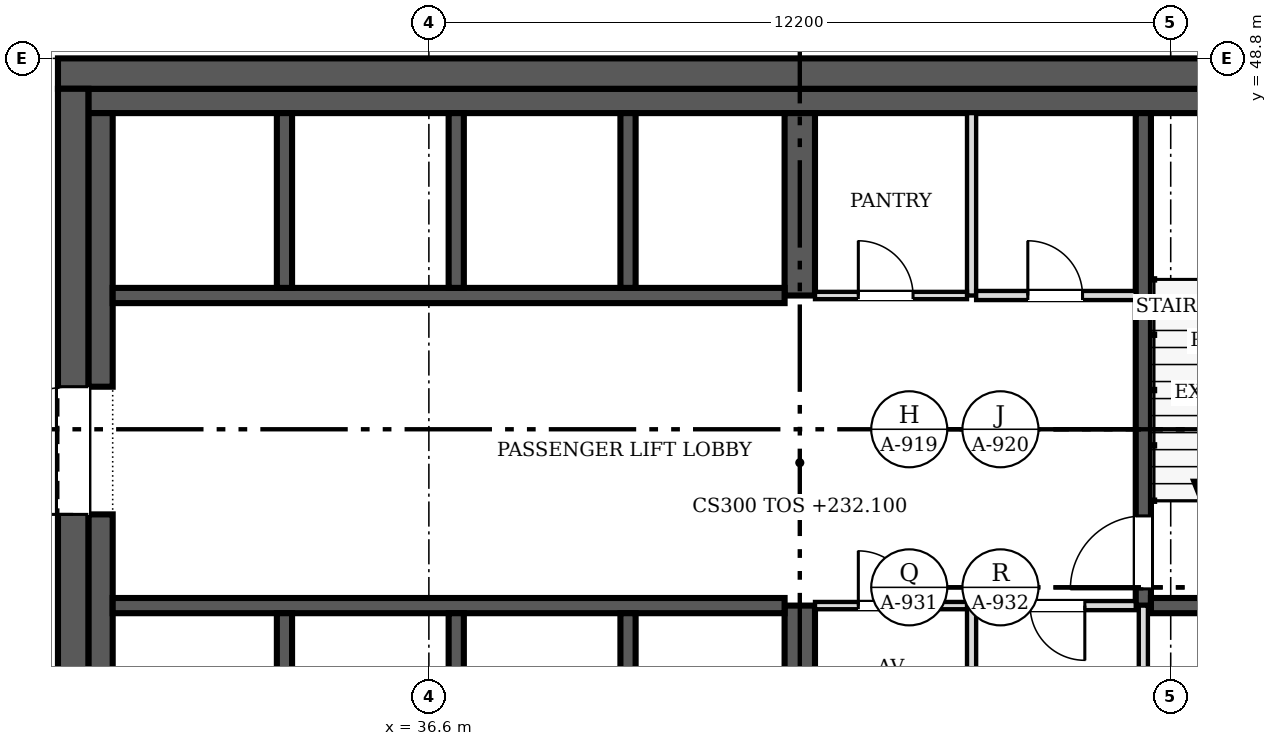
"""IFC4 building model, lengths in metres.
Left out: names, types, materials, properties, quantities, classifications, styles, units other than length and angle.
Written with IfcOpenShell. Run it as: python <this file> out.ifc"""

import sys

from ifc_helpers import new_model, si_unit, direction, frame, frame_2d, origin, place, context, subcontext, project, spatial, rectangle, extrude, source, transform, mapped, element, fill, save


model = new_model("IFC4")
c1 = context("Model", 3, precision=1e-05, world=origin(), true_north=direction((0.0, 1.0)))
c2 = subcontext(c1, "Body", "Model", "MODEL_VIEW")
j1 = project(units=[si_unit("LENGTHUNIT", "METRE"), si_unit("PLANEANGLEUNIT", "RADIAN")], contexts=[c1])
p1 = place(None, origin())
s1 = spatial("IfcSite", under=j1, at=p1, CompositionType="ELEMENT")
p2 = place(p1, origin())
s2 = spatial("IfcBuilding", under=s1, at=p2, CompositionType="ELEMENT")
p3 = place(p2, frame((0.0, 0.0, 232.1)))
s3 = spatial("IfcBuildingStorey", under=s2, at=p3, CompositionType="ELEMENT", Elevation=232.1)
p4 = place(p3, frame((30.75, 24.9, 0.0), z_axis=(0.0, 0.0, 1.0), x_axis=(0.0, 1.0, 0.0)))
e1 = element("IfcWall", 1, at=p4, inside=s3, PredefinedType="SHEAR", context=c2, shape_type="SweptSolid", body=[
    extrude(rectangle(XDim=23.4, YDim=0.5, at=frame_2d((11.7, 0.0))), origin(), (0.0, 0.0, 1.0), 4.8),
])
m1 = source(origin(), c2, "Body", "SweptSolid", [
    extrude(rectangle(XDim=2.1, YDim=2.4, at=frame_2d((1.05, 1.2))), frame((0.0, 0.26, 0.0), z_axis=(0.0, -1.0, 0.0), x_axis=(1.0, 0.0, 0.0)), (0.0, 0.0, 1.0), 0.52),
])
p5 = place(p4, frame((4.9, 0.0, 0.0)))
e2 = element("IfcOpeningElement", 2, at=p5, cuts=e1, PredefinedType="OPENING", context=c2, shape_type="MappedRepresentation", body=[
    mapped(m1, transform((0.0, 0.0, 0.0), scale=1.0)),
])
p6 = place(p4, frame((16.4, 0.0, 0.0)))
e3 = element("IfcOpeningElement", 3, at=p6, cuts=e1, PredefinedType="OPENING", context=c2, shape_type="MappedRepresentation", body=[
    mapped(m1, transform((0.0, 0.0, 0.0), scale=1.0)),
])
p7 = place(p3, frame((30.5, 48.55, 0.0), z_axis=(0.0, 0.0, 1.0), x_axis=(1.0, 0.0, 0.0)))
e4 = element("IfcWall", 4, at=p7, inside=s3, PredefinedType="SHEAR", context=c2, shape_type="SweptSolid", body=[
    extrude(rectangle(XDim=24.4, YDim=0.5, at=frame_2d((12.2, 0.0))), origin(), (0.0, 0.0, 1.0), 4.8),
])
p8 = place(p3, frame((31.0, 48.1, 0.0), z_axis=(0.0, 0.0, 1.0), x_axis=(1.0, 0.0, 0.0)))
e5 = element("IfcWall", 5, at=p8, inside=s3, PredefinedType="SOLIDWALL", context=c2, shape_type="SweptSolid", body=[
    extrude(rectangle(XDim=23.4, YDim=0.4, at=frame_2d((11.7, 0.0))), origin(), (0.0, 0.0, 1.0), 4.8),
])
p9 = place(p3, frame((31.2, 31.9, 0.0), z_axis=(0.0, 0.0, 1.0), x_axis=(0.0, 1.0, 0.0)))
e6 = element("IfcWall", 6, at=p9, inside=s3, PredefinedType="SOLIDWALL", context=c2, shape_type="SweptSolid", body=[
    extrude(rectangle(XDim=9.4, YDim=0.4, at=frame_2d((4.7, 0.0))), origin(), (0.0, 0.0, 1.0), 4.8),
])
p10 = place(p3, frame((31.2, 43.4, 0.0), z_axis=(0.0, 0.0, 1.0), x_axis=(0.0, 1.0, 0.0)))
e7 = element("IfcWall", 7, at=p10, inside=s3, PredefinedType="SOLIDWALL", context=c2, shape_type="SweptSolid", body=[
    extrude(rectangle(XDim=4.5, YDim=0.4, at=frame_2d((2.25, 0.0))), origin(), (0.0, 0.0, 1.0), 4.8),
])
p11 = place(p3, frame((42.7, 36.85, 0.0), z_axis=(0.0, 0.0, 1.0), x_axis=(0.0, 1.0, 0.0)))
e8 = element("IfcWall", 8, at=p11, inside=s3, PredefinedType="SHEAR", context=c2, shape_type="SweptSolid", body=[
    extrude(rectangle(XDim=2.95, YDim=0.5, at=frame_2d((1.475, 0.0))), origin(), (0.0, 0.0, 1.0), 4.8),
])
p12 = place(p3, frame((42.7, 44.9, 0.0), z_axis=(0.0, 0.0, 1.0), x_axis=(0.0, 1.0, 0.0)))
e9 = element("IfcWall", 9, at=p12, inside=s3, PredefinedType="SHEAR", context=c2, shape_type="SweptSolid", body=[
    extrude(rectangle(XDim=3.0, YDim=0.5, at=frame_2d((1.5, 0.0))), origin(), (0.0, 0.0, 1.0), 4.8),
])
for number, where, z_axis, x_axis in (
    (10, (31.4, 39.8, 0.0), (0.0, 0.0, 1.0), (1.0, 0.0, 0.0)),
    (11, (31.4, 44.9, 0.0), (0.0, 0.0, 1.0), (1.0, 0.0, 0.0)),
):
    element("IfcWall", number, at=place(p3, frame(where, z_axis=z_axis, x_axis=x_axis)), inside=s3, PredefinedType="SOLIDWALL", context=c2, shape_type="SweptSolid", body=[
        extrude(rectangle(XDim=11.05, YDim=0.25, at=frame_2d((5.525, 0.0))), origin(), (0.0, 0.0, 1.0), 4.8),
    ])
p13 = place(p3, frame((48.35, 47.9, 0.0), z_axis=(0.0, 0.0, 1.0), x_axis=(0.0, -1.0, 0.0)))
e12 = element("IfcWall", 12, at=p13, inside=s3, PredefinedType="SOLIDWALL", context=c2, shape_type="SweptSolid", body=[
    extrude(rectangle(XDim=8.1, YDim=0.25, at=frame_2d((4.05, 0.0))), origin(), (0.0, 0.0, 1.0), 4.8),
])
m2 = source(origin(), c2, "Body", "SweptSolid", [
    extrude(rectangle(XDim=1.2, YDim=2.1, at=frame_2d((0.6, 1.05))), frame((0.0, 0.135, 0.0), z_axis=(0.0, -1.0, 0.0), x_axis=(1.0, 0.0, 0.0)), (0.0, 0.0, 1.0), 0.27),
])
p14 = place(p13, frame((6.625, 0.0, 0.0)))
e13 = element("IfcOpeningElement", 13, at=p14, cuts=e12, PredefinedType="OPENING", context=c2, shape_type="MappedRepresentation", body=[
    mapped(m2, transform((0.0, 0.0, 0.0), scale=1.0)),
])
p15 = place(p3, frame((48.475, 39.8, 0.0), z_axis=(0.0, 0.0, 1.0), x_axis=(1.0, 0.0, 0.0)))
e14 = element("IfcWall", 14, at=p15, inside=s3, PredefinedType="SOLIDWALL", context=c2, shape_type="SweptSolid", body=[
    extrude(rectangle(XDim=3.4, YDim=0.25, at=frame_2d((1.7, 0.0))), origin(), (0.0, 0.0, 1.0), 4.8),
])
for number, where, z_axis, x_axis in (
    (15, (34.225, 36.85, 0.0), (0.0, 0.0, 1.0), (0.0, 1.0, 0.0)),
    (16, (37.05, 36.85, 0.0), (0.0, 0.0, 1.0), (0.0, 1.0, 0.0)),
    (17, (39.875, 36.85, 0.0), (0.0, 0.0, 1.0), (0.0, 1.0, 0.0)),
):
    element("IfcWall", number, at=place(p3, frame(where, z_axis=z_axis, x_axis=x_axis)), inside=s3, PredefinedType="SOLIDWALL", context=c2, shape_type="SweptSolid", body=[
        extrude(rectangle(XDim=2.825, YDim=0.25, at=frame_2d((1.413, 0.0))), origin(), (0.0, 0.0, 1.0), 4.8),
    ])
for number, where, z_axis, x_axis in (
    (18, (34.225, 45.025, 0.0), (0.0, 0.0, 1.0), (0.0, 1.0, 0.0)),
    (19, (37.05, 45.025, 0.0), (0.0, 0.0, 1.0), (0.0, 1.0, 0.0)),
    (20, (39.875, 45.025, 0.0), (0.0, 0.0, 1.0), (0.0, 1.0, 0.0)),
):
    element("IfcWall", number, at=place(p3, frame(where, z_axis=z_axis, x_axis=x_axis)), inside=s3, PredefinedType="SOLIDWALL", context=c2, shape_type="SweptSolid", body=[
        extrude(rectangle(XDim=2.875, YDim=0.25, at=frame_2d((1.438, 0.0))), origin(), (0.0, 0.0, 1.0), 4.8),
    ])
for number, where, z_axis, x_axis in (
    (21, (45.525, 36.85, 0.0), (0.0, 0.0, 1.0), (0.0, 1.0, 0.0)),
    (22, (48.35, 36.85, 0.0), (0.0, 0.0, 1.0), (0.0, 1.0, 0.0)),
):
    element("IfcWall", number, at=place(p3, frame(where, z_axis=z_axis, x_axis=x_axis)), inside=s3, PredefinedType="PARTITIONING", context=c2, shape_type="SweptSolid", body=[
        extrude(rectangle(XDim=2.95, YDim=0.15, at=frame_2d((1.475, 0.0))), origin(), (0.0, 0.0, 1.0), 4.6),
    ])
p16 = place(p3, frame((45.525, 44.9, 0.0), z_axis=(0.0, 0.0, 1.0), x_axis=(0.0, 1.0, 0.0)))
e23 = element("IfcWall", 23, at=p16, inside=s3, PredefinedType="PARTITIONING", context=c2, shape_type="SweptSolid", body=[
    extrude(rectangle(XDim=3.0, YDim=0.15, at=frame_2d((1.5, 0.0))), origin(), (0.0, 0.0, 1.0), 4.6),
])
p17 = place(p3, frame((45.45, 39.8, 0.0), z_axis=(0.0, 0.0, 1.0), x_axis=(-1.0, 0.0, 0.0)))
e24 = element("IfcWall", 24, at=p17, inside=s3, PredefinedType="PARTITIONING", context=c2, shape_type="SweptSolid", body=[
    extrude(rectangle(XDim=2.5, YDim=0.12, at=frame_2d((1.25, 0.0))), origin(), (0.0, 0.0, 1.0), 4.6),
])
m3 = source(origin(), c2, "Body", "SweptSolid", [
    extrude(rectangle(XDim=0.9, YDim=2.1, at=frame_2d((0.45, 1.05))), frame((0.0, 0.07, 0.0), z_axis=(0.0, -1.0, 0.0), x_axis=(1.0, 0.0, 0.0)), (0.0, 0.0, 1.0), 0.14),
])
p18 = place(p17, frame((0.887, 0.0, 0.0)))
e25 = element("IfcOpeningElement", 25, at=p18, cuts=e24, PredefinedType="OPENING", context=c2, shape_type="MappedRepresentation", body=[
    mapped(m3, transform((0.0, 0.0, 0.0), scale=1.0)),
])
p19 = place(p3, frame((48.225, 39.8, 0.0), z_axis=(0.0, 0.0, 1.0), x_axis=(-1.0, 0.0, 0.0)))
e26 = element("IfcWall", 26, at=p19, inside=s3, PredefinedType="PARTITIONING", context=c2, shape_type="SweptSolid", body=[
    extrude(rectangle(XDim=2.625, YDim=0.15, at=frame_2d((1.312, 0.0))), origin(), (0.0, 0.0, 1.0), 4.6),
])
m4 = source(origin(), c2, "Body", "SweptSolid", [
    extrude(rectangle(XDim=0.9, YDim=2.1, at=frame_2d((0.45, 1.05))), frame((0.0, 0.085, 0.0), z_axis=(0.0, -1.0, 0.0), x_axis=(1.0, 0.0, 0.0)), (0.0, 0.0, 1.0), 0.17),
])
p20 = place(p19, frame((0.837, 0.0, 0.0)))
e27 = element("IfcOpeningElement", 27, at=p20, cuts=e26, PredefinedType="OPENING", context=c2, shape_type="MappedRepresentation", body=[
    mapped(m4, transform((0.0, 0.0, 0.0), scale=1.0)),
])
p21 = place(p3, frame((42.95, 44.9, 0.0), z_axis=(0.0, 0.0, 1.0), x_axis=(1.0, 0.0, 0.0)))
e28 = element("IfcWall", 28, at=p21, inside=s3, PredefinedType="PARTITIONING", context=c2, shape_type="SweptSolid", body=[
    extrude(rectangle(XDim=2.5, YDim=0.12, at=frame_2d((1.25, 0.0))), origin(), (0.0, 0.0, 1.0), 4.6),
])
p22 = place(p21, frame((0.712, 0.0, 0.0)))
e29 = element("IfcOpeningElement", 29, at=p22, cuts=e28, PredefinedType="OPENING", context=c2, shape_type="MappedRepresentation", body=[
    mapped(m3, transform((0.0, 0.0, 0.0), scale=1.0)),
])
p23 = place(p3, frame((45.6, 44.9, 0.0), z_axis=(0.0, 0.0, 1.0), x_axis=(1.0, 0.0, 0.0)))
e30 = element("IfcWall", 30, at=p23, inside=s3, PredefinedType="PARTITIONING", context=c2, shape_type="SweptSolid", body=[
    extrude(rectangle(XDim=2.625, YDim=0.15, at=frame_2d((1.312, 0.0))), origin(), (0.0, 0.0, 1.0), 4.6),
])
p24 = place(p23, frame((0.85, 0.0, 0.0)))
e31 = element("IfcOpeningElement", 31, at=p24, cuts=e30, PredefinedType="OPENING", context=c2, shape_type="MappedRepresentation", body=[
    mapped(m4, transform((0.0, 0.0, 0.0), scale=1.0)),
])
m5 = source(origin(), c2, "Body", "SweptSolid", [
    extrude(rectangle(XDim=2.1, YDim=2.4, at=frame_2d((1.05, 1.2))), frame((0.0, 0.025, 0.0), z_axis=(0.0, -1.0, 0.0), x_axis=(1.0, 0.0, 0.0)), (0.0, 0.0, 1.0), 0.05),
])
p25 = place(p6, origin())
e32 = element("IfcDoor", 32, at=p25, inside=s3, OperationType="DOUBLE_DOOR_SINGLE_SWING", PredefinedType="DOOR", context=c2, shape_type="MappedRepresentation", body=[
    mapped(m5, transform((0.0, 0.0, 0.0), scale=1.0)),
])
fill(e3, e32)
m6 = source(origin(), c2, "Body", "SweptSolid", [
    extrude(rectangle(XDim=1.2, YDim=2.1, at=frame_2d((0.6, 1.05))), frame((0.0, 0.025, 0.0), z_axis=(0.0, -1.0, 0.0), x_axis=(1.0, 0.0, 0.0)), (0.0, 0.0, 1.0), 0.05),
])
p26 = place(p14, origin())
e33 = element("IfcDoor", 33, at=p26, inside=s3, OperationType="SINGLE_SWING_RIGHT", PredefinedType="DOOR", context=c2, shape_type="MappedRepresentation", body=[
    mapped(m6, transform((0.0, 0.0, 0.0), scale=1.0)),
])
fill(e13, e33)
m7 = source(origin(), c2, "Body", "SweptSolid", [
    extrude(rectangle(XDim=0.9, YDim=2.1, at=frame_2d((0.45, 1.05))), frame((0.0, 0.025, 0.0), z_axis=(0.0, -1.0, 0.0), x_axis=(1.0, 0.0, 0.0)), (0.0, 0.0, 1.0), 0.05),
])
p27 = place(p18, origin())
e34 = element("IfcDoor", 34, at=p27, inside=s3, OperationType="SINGLE_SWING_RIGHT", PredefinedType="DOOR", context=c2, shape_type="MappedRepresentation", body=[
    mapped(m7, transform((0.0, 0.0, 0.0), scale=1.0)),
])
fill(e25, e34)
p28 = place(p20, origin())
e35 = element("IfcDoor", 35, at=p28, inside=s3, OperationType="SINGLE_SWING_LEFT", PredefinedType="DOOR", context=c2, shape_type="MappedRepresentation", body=[
    mapped(m7, transform((0.0, 0.0, 0.0), scale=1.0)),
])
fill(e27, e35)
p29 = place(p22, origin())
e36 = element("IfcDoor", 36, at=p29, inside=s3, OperationType="SINGLE_SWING_LEFT", PredefinedType="DOOR", context=c2, shape_type="MappedRepresentation", body=[
    mapped(m7, transform((0.0, 0.0, 0.0), scale=1.0)),
])
fill(e29, e36)
p30 = place(p24, origin())
e37 = element("IfcDoor", 37, at=p30, inside=s3, OperationType="SINGLE_SWING_LEFT", PredefinedType="DOOR", context=c2, shape_type="MappedRepresentation", body=[
    mapped(m7, transform((0.0, 0.0, 0.0), scale=1.0)),
])
fill(e31, e37)
save(model, sys.argv[1])
